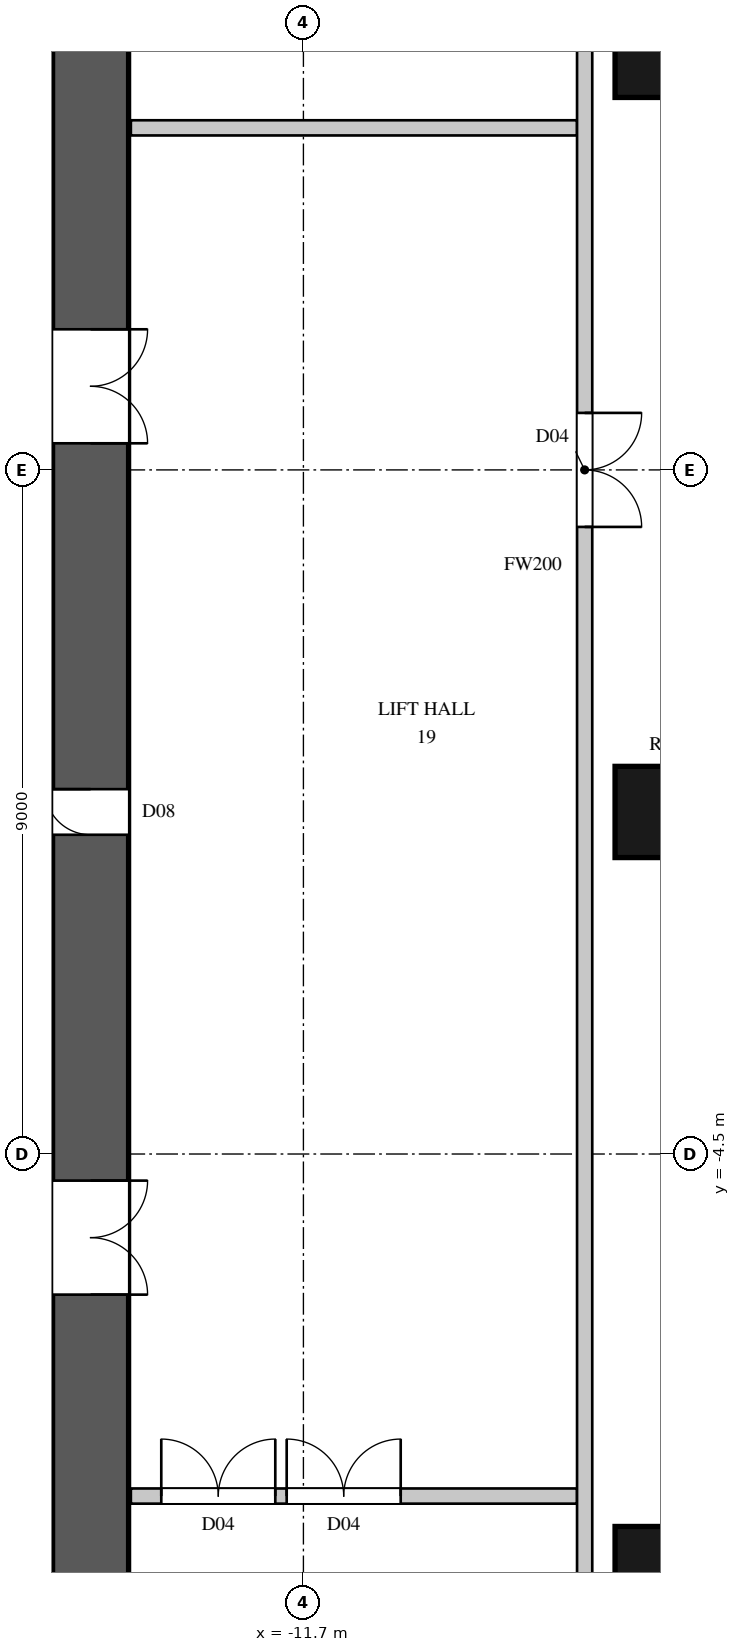
"""IFC4 building model, lengths in metres.
Left out: names, types, materials, properties, quantities, classifications, styles, units other than length and angle.
Written with IfcOpenShell. Run it as: python <this file> out.ifc"""

import sys

from ifc_helpers import new_model, si_unit, direction, frame, frame_2d, origin, origin_2d, place, context, subcontext, project, spatial, rectangle, circle, extrude, element, fill, save


model = new_model("IFC4")
c1 = context("Model", 3, precision=1e-05, world=origin(), true_north=direction((0.0, 1.0)))
c2 = subcontext(c1, "Body", "Model", "MODEL_VIEW")
j1 = project(units=[si_unit("LENGTHUNIT", "METRE"), si_unit("PLANEANGLEUNIT", "RADIAN")], contexts=[c1])
p1 = place(None, origin())
s1 = spatial("IfcSite", under=j1, at=p1, CompositionType="ELEMENT")
p2 = place(p1, origin())
s2 = spatial("IfcBuilding", under=s1, at=p2, CompositionType="ELEMENT")
p3 = place(p2, frame((0.0, 0.0, 98.7)))
s3 = spatial("IfcBuildingStorey", under=s2, at=p3, CompositionType="ELEMENT", Elevation=98.7)
for number, where, z_axis, x_axis in (
    (1, (-7.0, -10.0, 0.0), (0.0, 0.0, 1.0), (1.0, 0.0, 0.0)),
    (2, (-7.0, 0.0, 0.0), (0.0, 0.0, 1.0), (1.0, 0.0, 0.0)),
    (3, (-7.0, 10.0, 0.0), (0.0, 0.0, 1.0), (1.0, 0.0, 0.0)),
):
    element("IfcColumn", number, at=place(p3, frame(where, z_axis=z_axis, x_axis=x_axis)), inside=s3, PredefinedType="COLUMN", context=c2, shape_type="SweptSolid", body=[
        extrude(circle(Radius=0.6, at=origin_2d()), origin(), (0.0, 0.0, 1.0), 3.6),
    ])
p4 = place(p3, frame((-14.5, -14.8, 0.0), z_axis=(0.0, 0.0, 1.0), x_axis=(0.0, 1.0, 0.0)))
e4 = element("IfcWall", 4, at=p4, inside=s3, PredefinedType="SHEAR", context=c2, shape_type="SweptSolid", body=[
    extrude(rectangle(XDim=29.6, YDim=1.0, at=frame_2d((14.8, 0.0))), origin(), (0.0, 0.0, 1.0), 3.6),
])
p5 = place(p4, frame((8.45, 0.0, 0.0)))
e5 = element("IfcOpeningElement", 5, at=p5, cuts=e4, PredefinedType="OPENING", context=c2, shape_type="SweptSolid", body=[
    extrude(rectangle(XDim=1.5, YDim=2.4, at=frame_2d((0.75, 1.2))), frame((0.0, 0.51, 0.0), z_axis=(0.0, -1.0, 0.0), x_axis=(1.0, 0.0, 0.0)), (0.0, 0.0, 1.0), 1.02),
])
p6 = place(p4, frame((19.65, 0.0, 0.0)))
e6 = element("IfcOpeningElement", 6, at=p6, cuts=e4, PredefinedType="OPENING", context=c2, shape_type="SweptSolid", body=[
    extrude(rectangle(XDim=1.5, YDim=2.4, at=frame_2d((0.75, 1.2))), frame((0.0, 0.51, 0.0), z_axis=(0.0, -1.0, 0.0), x_axis=(1.0, 0.0, 0.0)), (0.0, 0.0, 1.0), 1.02),
])
p7 = place(p4, frame((14.5, 0.0, 0.0)))
e7 = element("IfcOpeningElement", 7, at=p7, cuts=e4, PredefinedType="OPENING", context=c2, shape_type="SweptSolid", body=[
    extrude(rectangle(XDim=0.6, YDim=2.0, at=frame_2d((0.3, 1.0))), frame((0.0, 0.51, 0.0), z_axis=(0.0, -1.0, 0.0), x_axis=(1.0, 0.0, 0.0)), (0.0, 0.0, 1.0), 1.02),
])
p8 = place(p3, frame((-13.97, -9.0, 0.0), z_axis=(0.0, 0.0, 1.0), x_axis=(1.0, 0.0, 0.0)))
e8 = element("IfcWall", 8, at=p8, inside=s3, PredefinedType="PARTITIONING", context=c2, shape_type="SweptSolid", body=[
    extrude(rectangle(XDim=5.87, YDim=0.2, at=frame_2d((2.935, 0.0))), origin(), (0.0, 0.0, 1.0), 3.3),
])
p9 = place(p8, frame((0.4, 0.0, 0.0)))
e9 = element("IfcOpeningElement", 9, at=p9, cuts=e8, PredefinedType="OPENING", context=c2, shape_type="SweptSolid", body=[
    extrude(rectangle(XDim=1.5, YDim=2.2, at=frame_2d((0.75, 1.1))), frame((0.0, 0.11, 0.0), z_axis=(0.0, -1.0, 0.0), x_axis=(1.0, 0.0, 0.0)), (0.0, 0.0, 1.0), 0.22),
])
p10 = place(p8, frame((2.05, 0.0, 0.0)))
e10 = element("IfcOpeningElement", 10, at=p10, cuts=e8, PredefinedType="OPENING", context=c2, shape_type="SweptSolid", body=[
    extrude(rectangle(XDim=1.5, YDim=2.2, at=frame_2d((0.75, 1.1))), frame((0.0, 0.11, 0.0), z_axis=(0.0, -1.0, 0.0), x_axis=(1.0, 0.0, 0.0)), (0.0, 0.0, 1.0), 0.22),
])
p11 = place(p3, frame((-13.97, 9.0, 0.0), z_axis=(0.0, 0.0, 1.0), x_axis=(1.0, 0.0, 0.0)))
e11 = element("IfcWall", 11, at=p11, inside=s3, PredefinedType="PARTITIONING", context=c2, shape_type="SweptSolid", body=[
    extrude(rectangle(XDim=5.87, YDim=0.2, at=frame_2d((2.935, 0.0))), origin(), (0.0, 0.0, 1.0), 3.3),
])
p12 = place(p3, frame((-8.0, -10.9, 0.0), z_axis=(0.0, 0.0, 1.0), x_axis=(0.0, 1.0, 0.0)))
e12 = element("IfcWall", 12, at=p12, inside=s3, PredefinedType="PARTITIONING", context=c2, shape_type="SweptSolid", body=[
    extrude(rectangle(XDim=28.3, YDim=0.2, at=frame_2d((14.15, 0.0))), origin(), (0.0, 0.0, 1.0), 3.3),
])
p13 = place(p12, frame((14.65, 0.0, 0.0)))
e13 = element("IfcOpeningElement", 13, at=p13, cuts=e12, PredefinedType="OPENING", context=c2, shape_type="SweptSolid", body=[
    extrude(rectangle(XDim=1.5, YDim=2.2, at=frame_2d((0.75, 1.1))), frame((0.0, 0.11, 0.0), z_axis=(0.0, -1.0, 0.0), x_axis=(1.0, 0.0, 0.0)), (0.0, 0.0, 1.0), 0.22),
])
p14 = place(p12, frame((26.55, 0.0, 0.0)))
e14 = element("IfcOpeningElement", 14, at=p14, cuts=e12, PredefinedType="OPENING", context=c2, shape_type="SweptSolid", body=[
    extrude(rectangle(XDim=1.6, YDim=2.4, at=frame_2d((0.8, 1.2))), frame((0.0, 0.11, 0.0), z_axis=(0.0, -1.0, 0.0), x_axis=(1.0, 0.0, 0.0)), (0.0, 0.0, 1.0), 0.22),
])
p15 = place(p13, origin())
e15 = element("IfcDoor", 15, at=p15, inside=s3, OperationType="DOUBLE_DOOR_SINGLE_SWING", PredefinedType="DOOR", context=c2, shape_type="SweptSolid", body=[
    extrude(rectangle(XDim=1.5, YDim=2.2, at=frame_2d((0.75, 1.1))), frame((0.0, 0.025, 0.0), z_axis=(0.0, -1.0, 0.0), x_axis=(1.0, 0.0, 0.0)), (0.0, 0.0, 1.0), 0.05),
])
fill(e13, e15)
p16 = place(p9, origin())
e16 = element("IfcDoor", 16, at=p16, inside=s3, OperationType="DOUBLE_DOOR_SINGLE_SWING", PredefinedType="DOOR", context=c2, shape_type="SweptSolid", body=[
    extrude(rectangle(XDim=1.5, YDim=2.2, at=frame_2d((0.75, 1.1))), frame((0.0, 0.025, 0.0), z_axis=(0.0, -1.0, 0.0), x_axis=(1.0, 0.0, 0.0)), (0.0, 0.0, 1.0), 0.05),
])
fill(e9, e16)
p17 = place(p10, origin())
e17 = element("IfcDoor", 17, at=p17, inside=s3, OperationType="DOUBLE_DOOR_SINGLE_SWING", PredefinedType="DOOR", context=c2, shape_type="SweptSolid", body=[
    extrude(rectangle(XDim=1.5, YDim=2.2, at=frame_2d((0.75, 1.1))), frame((0.0, 0.025, 0.0), z_axis=(0.0, -1.0, 0.0), x_axis=(1.0, 0.0, 0.0)), (0.0, 0.0, 1.0), 0.05),
])
fill(e10, e17)
p18 = place(p5, origin())
e18 = element("IfcDoor", 18, at=p18, inside=s3, OperationType="DOUBLE_DOOR_SINGLE_SWING", PredefinedType="DOOR", context=c2, shape_type="SweptSolid", body=[
    extrude(rectangle(XDim=1.5, YDim=2.4, at=frame_2d((0.75, 1.2))), frame((0.0, -0.445, 0.0), z_axis=(0.0, -1.0, 0.0), x_axis=(1.0, 0.0, 0.0)), (0.0, 0.0, 1.0), 0.05),
])
fill(e5, e18)
p19 = place(p6, origin())
e19 = element("IfcDoor", 19, at=p19, inside=s3, OperationType="DOUBLE_DOOR_SINGLE_SWING", PredefinedType="DOOR", context=c2, shape_type="SweptSolid", body=[
    extrude(rectangle(XDim=1.5, YDim=2.4, at=frame_2d((0.75, 1.2))), frame((0.0, -0.445, 0.0), z_axis=(0.0, -1.0, 0.0), x_axis=(1.0, 0.0, 0.0)), (0.0, 0.0, 1.0), 0.05),
])
fill(e6, e19)
p20 = place(p7, origin())
e20 = element("IfcDoor", 20, at=p20, inside=s3, OperationType="SINGLE_SWING_RIGHT", PredefinedType="DOOR", context=c2, shape_type="SweptSolid", body=[
    extrude(rectangle(XDim=0.6, YDim=2.0, at=frame_2d((0.3, 1.0))), frame((0.0, 0.495, 0.0), z_axis=(0.0, -1.0, 0.0), x_axis=(1.0, 0.0, 0.0)), (0.0, 0.0, 1.0), 0.05),
])
fill(e7, e20)
save(model, sys.argv[1])
